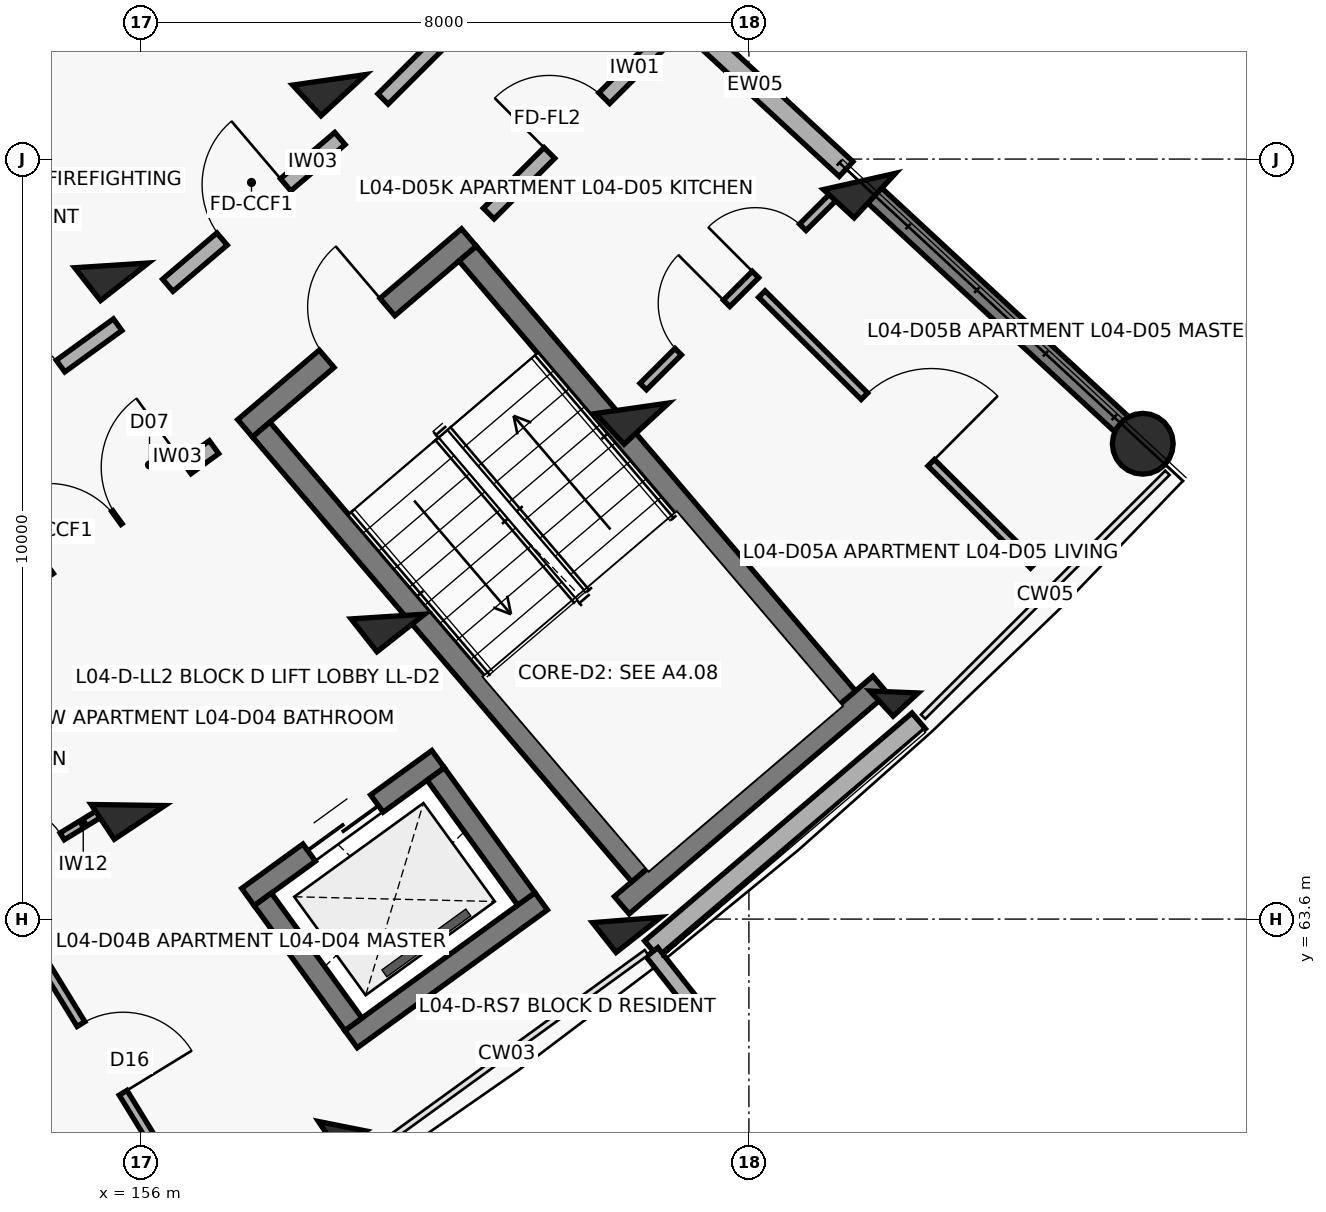
"""IFC4 building model, lengths in metres.
Left out: names, types, materials, properties, quantities, classifications, styles, units other than length and angle.
Written with IfcOpenShell. Run it as: python <this file> out.ifc"""

import sys

from ifc_helpers import new_model, si_unit, direction, frame, frame_2d, origin, origin_2d, place, context, subcontext, project, spatial, rectangle, circle, extrude, element, fill, save


model = new_model("IFC4")
c1 = context("Model", 3, precision=1e-05, world=origin(), true_north=direction((0.0, 1.0)))
c2 = subcontext(c1, "Body", "Model", "MODEL_VIEW")
j1 = project(units=[si_unit("LENGTHUNIT", "METRE"), si_unit("PLANEANGLEUNIT", "RADIAN")], contexts=[c1])
p1 = place(None, origin())
s1 = spatial("IfcSite", under=j1, at=p1, CompositionType="ELEMENT")
p2 = place(p1, origin())
s2 = spatial("IfcBuilding", under=s1, at=p2, CompositionType="ELEMENT")
p3 = place(p2, frame((0.0, 0.0, 14.3)))
s3 = spatial("IfcBuildingStorey", under=s2, at=p3, CompositionType="ELEMENT", Elevation=14.3)
p4 = place(p3, frame((155.831, 65.101, 0.0), z_axis=(0.0, 0.0, 1.0), x_axis=(0.554844427448, -0.83195412213, 0.0)))
e1 = element("IfcColumn", 1, at=p4, inside=s3, PredefinedType="COLUMN", context=c2, shape_type="SweptSolid", body=[
    extrude(rectangle(XDim=0.55, YDim=0.8, at=origin_2d()), origin(), (0.0, 0.0, 1.0), 3.1),
])
p5 = place(p3, frame((158.649, 60.875, 0.0), z_axis=(0.0, 0.0, 1.0), x_axis=(0.554844427448, -0.83195412213, 0.0)))
e2 = element("IfcColumn", 2, at=p5, inside=s3, PredefinedType="COLUMN", context=c2, shape_type="SweptSolid", body=[
    extrude(rectangle(XDim=0.45, YDim=0.45, at=origin_2d()), origin(), (0.0, 0.0, 1.0), 3.1),
])
for number, where, z_axis, x_axis in (
    (3, (155.614, 72.202, 0.0), (0.0, 0.0, 1.0), (0.618, -0.786, 0.0)),
    (4, (159.25, 67.581, 0.0), (0.0, 0.0, 1.0), (0.618, -0.786, 0.0)),
):
    element("IfcColumn", number, at=place(p3, frame(where, z_axis=z_axis, x_axis=x_axis)), inside=s3, PredefinedType="COLUMN", context=c2, shape_type="SweptSolid", body=[
        extrude(rectangle(XDim=0.55, YDim=0.8, at=origin_2d()), origin(), (0.0, 0.0, 1.0), 3.1),
    ])
p6 = place(p3, frame((162.392, 63.589, 0.0), z_axis=(0.0, 0.0, 1.0), x_axis=(0.618408395358, -0.785856893175, 0.0)))
e5 = element("IfcColumn", 5, at=p6, inside=s3, PredefinedType="COLUMN", context=c2, shape_type="SweptSolid", body=[
    extrude(rectangle(XDim=0.5, YDim=0.75, at=origin_2d()), origin(), (0.0, 0.0, 1.0), 3.1),
])
for number, where, z_axis, x_axis in (
    (6, (158.477, 74.643, 0.0), (0.0, 0.0, 1.0), (0.678, -0.735, 0.0)),
    (7, (162.465, 70.322, 0.0), (0.0, 0.0, 1.0), (0.678, -0.735, 0.0)),
):
    element("IfcColumn", number, at=place(p3, frame(where, z_axis=z_axis, x_axis=x_axis)), inside=s3, PredefinedType="COLUMN", context=c2, shape_type="SweptSolid", body=[
        extrude(rectangle(XDim=0.55, YDim=0.8, at=origin_2d()), origin(), (0.0, 0.0, 1.0), 3.1),
    ])
p7 = place(p3, frame((165.91, 66.588, 0.0), z_axis=(0.0, 0.0, 1.0), x_axis=(0.678159669868, -0.73491459515, 0.0)))
e8 = element("IfcColumn", 8, at=p7, inside=s3, PredefinedType="COLUMN", context=c2, shape_type="SweptSolid", body=[
    extrude(rectangle(XDim=0.45, YDim=0.45, at=origin_2d()), origin(), (0.0, 0.0, 1.0), 3.1),
])
p8 = place(p3, frame((165.455, 73.306, 0.0), z_axis=(0.0, 0.0, 1.0), x_axis=(0.733729864503, -0.679441304262, 0.0)))
e9 = element("IfcColumn", 9, at=p8, inside=s3, PredefinedType="COLUMN", context=c2, shape_type="SweptSolid", body=[
    extrude(rectangle(XDim=0.55, YDim=0.8, at=origin_2d()), origin(), (0.0, 0.0, 1.0), 3.1),
])
p9 = place(p3, frame((169.182, 69.854, 0.0), z_axis=(0.0, 0.0, 1.0), x_axis=(0.733729864503, -0.679441304262, 0.0)))
e10 = element("IfcColumn", 10, at=p9, inside=s3, PredefinedType="COLUMN", context=c2, shape_type="SweptSolid", body=[
    extrude(circle(Radius=0.4, at=origin_2d()), origin(), (0.0, 0.0, 1.0), 3.1),
])
p10 = place(p3, frame((165.587, 73.184, 0.0), z_axis=(0.0, 0.0, 1.0), x_axis=(0.733739663667, -0.679430721974, 0.0)))
e11 = element("IfcWall", 11, at=p10, inside=s3, PredefinedType="SHEAR", context=c2, shape_type="SweptSolid", body=[
    extrude(rectangle(XDim=4.72, YDim=0.27, at=frame_2d((2.36, 0.0))), origin(), (0.0, 0.0, 1.0), 2.86),
])
p11 = place(p3, frame((162.716, 63.209, 0.0), z_axis=(0.0, 0.0, 1.0), x_axis=(0.760968923704, 0.64878833001, 0.0)))
e12 = element("IfcWall", 12, at=p11, inside=s3, PredefinedType="SOLIDWALL", context=c2, shape_type="SweptSolid", body=[
    extrude(rectangle(XDim=4.623, YDim=0.272, at=frame_2d((2.311, 0.0))), origin(), (0.0, 0.0, 1.0), 2.25),
])
p12 = place(p3, frame((162.726, 63.164, 0.0), z_axis=(0.0, 0.0, 1.0), x_axis=(0.618456270212, -0.785819217019, 0.0)))
e13 = element("IfcWall", 13, at=p12, inside=s3, PredefinedType="PARAPET", context=c2, shape_type="SweptSolid", body=[
    extrude(rectangle(XDim=0.9, YDim=0.195, at=frame_2d((0.45, 0.0))), origin(), (0.0, 0.0, 1.0), 2.25),
])
p13 = place(p3, frame((153.589, 74.808, 0.0), z_axis=(0.0, 0.0, 1.0), x_axis=(0.760985425115, 0.648768974876, 0.0)))
e14 = element("IfcWall", 14, at=p13, inside=s3, PredefinedType="SOLIDWALL", context=c2, shape_type="SweptSolid", body=[
    extrude(rectangle(XDim=3.464, YDim=0.23, at=frame_2d((1.732, 0.0))), origin(), (0.0, 0.0, 1.0), 2.25),
])
p14 = place(p13, frame((0.932, 0.0, 0.32)))
e15 = element("IfcOpeningElement", 15, at=p14, cuts=e14, PredefinedType="OPENING", context=c2, shape_type="SweptSolid", body=[
    extrude(rectangle(XDim=1.6, YDim=1.5, at=frame_2d((0.8, 0.75))), frame((0.0, 0.125, 0.0), z_axis=(0.0, -1.0, 0.0), x_axis=(1.0, 0.0, 0.0)), (0.0, 0.0, 1.0), 0.25),
])
p15 = place(p3, frame((159.262, 79.041, 0.0), z_axis=(0.0, 0.0, 1.0), x_axis=(0.733738684326, -0.679431779595, 0.0)))
e16 = element("IfcWall", 16, at=p15, inside=s3, PredefinedType="SOLIDWALL", context=c2, shape_type="SweptSolid", body=[
    extrude(rectangle(XDim=8.2, YDim=0.265, at=frame_2d((4.1, 0.0))), origin(), (0.0, 0.0, 1.0), 2.08),
])
p16 = place(p15, frame((3.59, 0.0, 0.75)))
e17 = element("IfcOpeningElement", 17, at=p16, cuts=e16, PredefinedType="OPENING", context=c2, shape_type="SweptSolid", body=[
    extrude(rectangle(XDim=1.35, YDim=1.35, at=frame_2d((0.675, 0.675))), frame((0.0, 0.142, 0.0), z_axis=(0.0, -1.0, 0.0), x_axis=(1.0, 0.0, 0.0)), (0.0, 0.0, 1.0), 0.285),
])
p17 = place(p3, frame((157.372, 70.058, 0.0), z_axis=(0.0, 0.0, 1.0), x_axis=(0.760990583254, 0.648762924495, 0.0)))
e18 = element("IfcWall", 18, at=p17, inside=s3, PredefinedType="SHEAR", context=c2, shape_type="SweptSolid", body=[
    extrude(rectangle(XDim=3.87, YDim=0.3, at=frame_2d((1.935, 0.0))), origin(), (0.0, 0.0, 1.0), 3.1),
])
p18 = place(p17, frame((1.41, 0.0, 0.0)))
e19 = element("IfcOpeningElement", 19, at=p18, cuts=e18, PredefinedType="OPENING", context=c2, shape_type="SweptSolid", body=[
    extrude(rectangle(XDim=1.05, YDim=2.15, at=frame_2d((0.525, 1.075))), frame((0.0, 0.16, 0.0), z_axis=(0.0, -1.0, 0.0), x_axis=(1.0, 0.0, 0.0)), (0.0, 0.0, 1.0), 0.32),
])
p19 = place(p3, frame((162.327, 63.783, 0.0), z_axis=(0.0, 0.0, 1.0), x_axis=(0.760969560012, 0.648787583678, 0.0)))
e20 = element("IfcWall", 20, at=p19, inside=s3, PredefinedType="SHEAR", context=c2, shape_type="SweptSolid", body=[
    extrude(rectangle(XDim=4.47, YDim=0.3, at=frame_2d((2.235, 0.0))), origin(), (0.0, 0.0, 1.0), 3.1),
])
p20 = place(p3, frame((157.583, 70.041, 0.0), z_axis=(0.0, 0.0, 1.0), x_axis=(0.648762810187, -0.760990680704, 0.0)))
e21 = element("IfcWall", 21, at=p20, inside=s3, PredefinedType="SHEAR", context=c2, shape_type="SweptSolid", body=[
    extrude(rectangle(XDim=7.69, YDim=0.3, at=frame_2d((3.845, 0.0))), origin(), (0.0, 0.0, 1.0), 3.1),
])
p21 = place(p3, frame((160.3, 72.357, 0.0), z_axis=(0.0, 0.0, 1.0), x_axis=(0.648781194888, -0.760975006922, 0.0)))
e22 = element("IfcWall", 22, at=p21, inside=s3, PredefinedType="SHEAR", context=c2, shape_type="SweptSolid", body=[
    extrude(rectangle(XDim=7.69, YDim=0.3, at=frame_2d((3.845, 0.0))), origin(), (0.0, 0.0, 1.0), 3.1),
])
p22 = place(p3, frame((157.409, 63.89, 0.0), z_axis=(0.0, 0.0, 1.0), x_axis=(0.809510936031, 0.587104798521, 0.0)))
e23 = element("IfcWall", 23, at=p22, inside=s3, PredefinedType="SHEAR", context=c2, shape_type="SweptSolid", body=[
    extrude(rectangle(XDim=3.09, YDim=0.28, at=frame_2d((1.545, 0.0))), origin(), (0.0, 0.0, 1.0), 3.1),
])
p23 = place(p22, frame((0.995, 0.0, 0.0)))
e24 = element("IfcOpeningElement", 24, at=p23, cuts=e23, PredefinedType="OPENING", context=c2, shape_type="SweptSolid", body=[
    extrude(rectangle(XDim=1.1, YDim=2.15, at=frame_2d((0.55, 1.075))), frame((0.0, 0.15, 0.0), z_axis=(0.0, -1.0, 0.0), x_axis=(1.0, 0.0, 0.0)), (0.0, 0.0, 1.0), 0.3),
])
p24 = place(p3, frame((158.765, 62.021, 0.0), z_axis=(0.0, 0.0, 1.0), x_axis=(0.809548485838, 0.587053020669, 0.0)))
e25 = element("IfcWall", 25, at=p24, inside=s3, PredefinedType="SHEAR", context=c2, shape_type="SweptSolid", body=[
    extrude(rectangle(XDim=3.09, YDim=0.28, at=frame_2d((1.545, 0.0))), origin(), (0.0, 0.0, 1.0), 3.1),
])
p25 = place(p3, frame((157.604, 63.859, 0.0), z_axis=(0.0, 0.0, 1.0), x_axis=(0.587127188998, -0.809494696671, 0.0)))
e26 = element("IfcWall", 26, at=p25, inside=s3, PredefinedType="SHEAR", context=c2, shape_type="SweptSolid", body=[
    extrude(rectangle(XDim=2.03, YDim=0.28, at=frame_2d((1.015, 0.0))), origin(), (0.0, 0.0, 1.0), 3.1),
])
p26 = place(p3, frame((159.879, 65.509, 0.0), z_axis=(0.0, 0.0, 1.0), x_axis=(0.58704837408, -0.809551855344, 0.0)))
e27 = element("IfcWall", 27, at=p26, inside=s3, PredefinedType="SHEAR", context=c2, shape_type="SweptSolid", body=[
    extrude(rectangle(XDim=2.03, YDim=0.28, at=frame_2d((1.015, 0.0))), origin(), (0.0, 0.0, 1.0), 3.1),
])
p27 = place(p3, frame((152.434, 63.141, 0.0), z_axis=(0.0, 0.0, 1.0), x_axis=(0.853089873067, 0.521763996909, 0.0)))
e28 = element("IfcWall", 28, at=p27, inside=s3, PredefinedType="PARTITIONING", context=c2, shape_type="SweptSolid", body=[
    extrude(rectangle(XDim=3.616, YDim=0.105, at=frame_2d((1.808, 0.0))), origin(), (0.0, 0.0, 1.0), 2.08),
])
p28 = place(p27, frame((0.65, 0.0, 0.0)))
e29 = element("IfcOpeningElement", 29, at=p28, cuts=e28, PredefinedType="OPENING", context=c2, shape_type="SweptSolid", body=[
    extrude(rectangle(XDim=0.9, YDim=2.1, at=frame_2d((0.45, 1.05))), frame((0.0, 0.062, 0.0), z_axis=(0.0, -1.0, 0.0), x_axis=(1.0, 0.0, 0.0)), (0.0, 0.0, 1.0), 0.125),
])
p29 = place(p27, frame((2.086, 0.0, 0.0)))
e30 = element("IfcOpeningElement", 30, at=p29, cuts=e28, PredefinedType="OPENING", context=c2, shape_type="SweptSolid", body=[
    extrude(rectangle(XDim=0.88, YDim=2.1, at=frame_2d((0.44, 1.05))), frame((0.0, 0.062, 0.0), z_axis=(0.0, -1.0, 0.0), x_axis=(1.0, 0.0, 0.0)), (0.0, 0.0, 1.0), 0.125),
])
p30 = place(p3, frame((154.169, 63.919, 0.0), z_axis=(0.0, 0.0, 1.0), x_axis=(0.522980301869, -0.852344768188, 0.0)))
e31 = element("IfcWall", 31, at=p30, inside=s3, PredefinedType="PARTITIONING", context=c2, shape_type="SweptSolid", body=[
    extrude(rectangle(XDim=5.05, YDim=0.12, at=frame_2d((2.525, 0.0))), origin(), (0.0, 0.0, 1.0), 2.08),
])
p31 = place(p30, frame((1.995, 0.0, 0.0)))
e32 = element("IfcOpeningElement", 32, at=p31, cuts=e31, PredefinedType="OPENING", context=c2, shape_type="SweptSolid", body=[
    extrude(rectangle(XDim=1.06, YDim=2.1, at=frame_2d((0.53, 1.05))), frame((0.0, 0.07, 0.0), z_axis=(0.0, -1.0, 0.0), x_axis=(1.0, 0.0, 0.0)), (0.0, 0.0, 1.0), 0.14),
])
p32 = place(p3, frame((154.423, 67.968, 0.0), z_axis=(0.0, 0.0, 1.0), x_axis=(0.809516127005, 0.587097641043, 0.0)))
e33 = element("IfcWall", 33, at=p32, inside=s3, PredefinedType="SOLIDWALL", context=c2, shape_type="SweptSolid", body=[
    extrude(rectangle(XDim=3.137, YDim=0.21, at=frame_2d((1.569, 0.0))), origin(), (0.0, 0.0, 1.0), 2.08),
])
p33 = place(p32, frame((0.45, 0.0, 0.0)))
e34 = element("IfcOpeningElement", 34, at=p33, cuts=e33, PredefinedType="OPENING", context=c2, shape_type="SweptSolid", body=[
    extrude(rectangle(XDim=1.1, YDim=2.15, at=frame_2d((0.55, 1.075))), frame((0.0, 0.115, 0.0), z_axis=(0.0, -1.0, 0.0), x_axis=(1.0, 0.0, 0.0)), (0.0, 0.0, 1.0), 0.23),
])
p34 = place(p32, frame((1.567, 0.0, 0.0)))
e35 = element("IfcOpeningElement", 35, at=p34, cuts=e33, PredefinedType="OPENING", context=c2, shape_type="SweptSolid", body=[
    extrude(rectangle(XDim=1.12, YDim=2.15, at=frame_2d((0.56, 1.075))), frame((0.0, 0.115, 0.0), z_axis=(0.0, -1.0, 0.0), x_axis=(1.0, 0.0, 0.0)), (0.0, 0.0, 1.0), 0.23),
])
p35 = place(p3, frame((153.285, 69.674, 0.0), z_axis=(0.0, 0.0, 1.0), x_axis=(0.809505174959, 0.587112741911, 0.0)))
e36 = element("IfcWall", 36, at=p35, inside=s3, PredefinedType="SOLIDWALL", context=c2, shape_type="SweptSolid", body=[
    extrude(rectangle(XDim=2.976, YDim=0.19, at=frame_2d((1.488, 0.0))), origin(), (0.0, 0.0, 1.0), 2.08),
])
p36 = place(p35, frame((0.928, 0.0, 0.0)))
e37 = element("IfcOpeningElement", 37, at=p36, cuts=e36, PredefinedType="OPENING", context=c2, shape_type="SweptSolid", body=[
    extrude(rectangle(XDim=1.12, YDim=2.15, at=frame_2d((0.56, 1.075))), frame((0.0, 0.105, 0.0), z_axis=(0.0, -1.0, 0.0), x_axis=(1.0, 0.0, 0.0)), (0.0, 0.0, 1.0), 0.21),
])
p37 = place(p3, frame((156.354, 71.94, 0.0), z_axis=(0.0, 0.0, 1.0), x_axis=(0.760991187621, 0.648762215579, 0.0)))
e38 = element("IfcWall", 38, at=p37, inside=s3, PredefinedType="SOLIDWALL", context=c2, shape_type="SweptSolid", body=[
    extrude(rectangle(XDim=2.976, YDim=0.21, at=frame_2d((1.488, 0.0))), origin(), (0.0, 0.0, 1.0), 2.08),
])
p38 = place(p37, frame((0.938, 0.0, 0.0)))
e39 = element("IfcOpeningElement", 39, at=p38, cuts=e38, PredefinedType="OPENING", context=c2, shape_type="SweptSolid", body=[
    extrude(rectangle(XDim=1.1, YDim=2.15, at=frame_2d((0.55, 1.075))), frame((0.0, 0.115, 0.0), z_axis=(0.0, -1.0, 0.0), x_axis=(1.0, 0.0, 0.0)), (0.0, 0.0, 1.0), 0.23),
])
p39 = place(p3, frame((160.576, 72.884, 0.0), z_axis=(0.0, 0.0, 1.0), x_axis=(0.70773973846, 0.706473256822, 0.0)))
e40 = element("IfcWall", 40, at=p39, inside=s3, PredefinedType="SOLIDWALL", context=c2, shape_type="SweptSolid", body=[
    extrude(rectangle(XDim=3.277, YDim=0.2, at=frame_2d((1.639, 0.0))), origin(), (0.0, 0.0, 1.0), 2.08),
])
p40 = place(p39, frame((1.128, 0.0, 0.0)))
e41 = element("IfcOpeningElement", 41, at=p40, cuts=e40, PredefinedType="OPENING", context=c2, shape_type="SweptSolid", body=[
    extrude(rectangle(XDim=1.02, YDim=2.15, at=frame_2d((0.51, 1.075))), frame((0.0, 0.11, 0.0), z_axis=(0.0, -1.0, 0.0), x_axis=(1.0, 0.0, 0.0)), (0.0, 0.0, 1.0), 0.22),
])
p41 = place(p3, frame((159.186, 74.39, 0.0), z_axis=(0.0, 0.0, 1.0), x_axis=(0.70773330139, 0.706479705373, 0.0)))
e42 = element("IfcWall", 42, at=p41, inside=s3, PredefinedType="SOLIDWALL", context=c2, shape_type="SweptSolid", body=[
    extrude(rectangle(XDim=3.116, YDim=0.19, at=frame_2d((1.558, 0.0))), origin(), (0.0, 0.0, 1.0), 2.08),
])
p42 = place(p41, frame((1.098, 0.0, 0.0)))
e43 = element("IfcOpeningElement", 43, at=p42, cuts=e42, PredefinedType="OPENING", context=c2, shape_type="SweptSolid", body=[
    extrude(rectangle(XDim=0.92, YDim=2.1, at=frame_2d((0.46, 1.05))), frame((0.0, 0.105, 0.0), z_axis=(0.0, -1.0, 0.0), x_axis=(1.0, 0.0, 0.0)), (0.0, 0.0, 1.0), 0.21),
])
p43 = place(p3, frame((162.609, 70.607, 0.0), z_axis=(0.0, 0.0, 1.0), x_axis=(0.707714058013, 0.70649898237, 0.0)))
e44 = element("IfcWall", 44, at=p43, inside=s3, PredefinedType="PARTITIONING", context=c2, shape_type="SweptSolid", body=[
    extrude(rectangle(XDim=3.617, YDim=0.12, at=frame_2d((1.808, 0.0))), origin(), (0.0, 0.0, 1.0), 2.08),
])
p44 = place(p43, frame((0.65, 0.0, 0.0)))
e45 = element("IfcOpeningElement", 45, at=p44, cuts=e44, PredefinedType="OPENING", context=c2, shape_type="SweptSolid", body=[
    extrude(rectangle(XDim=0.9, YDim=2.1, at=frame_2d((0.45, 1.05))), frame((0.0, 0.07, 0.0), z_axis=(0.0, -1.0, 0.0), x_axis=(1.0, 0.0, 0.0)), (0.0, 0.0, 1.0), 0.14),
])
p45 = place(p43, frame((2.086, 0.0, 0.0)))
e46 = element("IfcOpeningElement", 46, at=p45, cuts=e44, PredefinedType="OPENING", context=c2, shape_type="SweptSolid", body=[
    extrude(rectangle(XDim=0.88, YDim=2.1, at=frame_2d((0.44, 1.05))), frame((0.0, 0.07, 0.0), z_axis=(0.0, -1.0, 0.0), x_axis=(1.0, 0.0, 0.0)), (0.0, 0.0, 1.0), 0.14),
])
p46 = place(p3, frame((164.17, 71.824, 0.0), z_axis=(0.0, 0.0, 1.0), x_axis=(0.708531494679, -0.70567919131, 0.0)))
e47 = element("IfcWall", 47, at=p46, inside=s3, PredefinedType="PARTITIONING", context=c2, shape_type="SweptSolid", body=[
    extrude(rectangle(XDim=5.05, YDim=0.12, at=frame_2d((2.525, 0.0))), origin(), (0.0, 0.0, 1.0), 2.08),
])
p47 = place(p46, frame((1.905, 0.0, 0.0)))
e48 = element("IfcOpeningElement", 48, at=p47, cuts=e47, PredefinedType="OPENING", context=c2, shape_type="SweptSolid", body=[
    extrude(rectangle(XDim=1.24, YDim=2.1, at=frame_2d((0.62, 1.05))), frame((0.0, 0.07, 0.0), z_axis=(0.0, -1.0, 0.0), x_axis=(1.0, 0.0, 0.0)), (0.0, 0.0, 1.0), 0.14),
])
p48 = place(p18, origin())
e49 = element("IfcDoor", 49, at=p48, inside=s3, OperationType="SINGLE_SWING_RIGHT", PredefinedType="DOOR", context=c2, shape_type="SweptSolid", body=[
    extrude(rectangle(XDim=1.05, YDim=2.15, at=frame_2d((0.525, 1.075))), frame((0.0, 0.025, 0.0), z_axis=(0.0, -1.0, 0.0), x_axis=(1.0, 0.0, 0.0)), (0.0, 0.0, 1.0), 0.05),
])
fill(e19, e49)
p49 = place(p23, origin())
e50 = element("IfcDoor", 50, at=p49, inside=s3, OperationType="DOUBLE_DOOR_SLIDING", PredefinedType="DOOR", context=c2, shape_type="SweptSolid", body=[
    extrude(rectangle(XDim=1.1, YDim=2.15, at=frame_2d((0.55, 1.075))), frame((0.0, 0.025, 0.0), z_axis=(0.0, -1.0, 0.0), x_axis=(1.0, 0.0, 0.0)), (0.0, 0.0, 1.0), 0.05),
])
fill(e24, e50)
p50 = place(p29, origin())
e51 = element("IfcDoor", 51, at=p50, inside=s3, OperationType="SINGLE_SWING_LEFT", PredefinedType="DOOR", context=c2, shape_type="SweptSolid", body=[
    extrude(rectangle(XDim=0.88, YDim=2.1, at=frame_2d((0.44, 1.05))), frame((0.0, 0.025, 0.0), z_axis=(0.0, -1.0, 0.0), x_axis=(1.0, 0.0, 0.0)), (0.0, 0.0, 1.0), 0.05),
])
fill(e30, e51)
p51 = place(p31, origin())
e52 = element("IfcDoor", 52, at=p51, inside=s3, OperationType="SINGLE_SWING_RIGHT", PredefinedType="DOOR", context=c2, shape_type="SweptSolid", body=[
    extrude(rectangle(XDim=1.06, YDim=2.1, at=frame_2d((0.53, 1.05))), frame((0.0, 0.025, 0.0), z_axis=(0.0, -1.0, 0.0), x_axis=(1.0, 0.0, 0.0)), (0.0, 0.0, 1.0), 0.05),
])
fill(e32, e52)
p52 = place(p33, origin())
e53 = element("IfcDoor", 53, at=p52, inside=s3, OperationType="SINGLE_SWING_LEFT", PredefinedType="DOOR", context=c2, shape_type="SweptSolid", body=[
    extrude(rectangle(XDim=1.1, YDim=2.15, at=frame_2d((0.55, 1.075))), frame((0.0, 0.025, 0.0), z_axis=(0.0, -1.0, 0.0), x_axis=(1.0, 0.0, 0.0)), (0.0, 0.0, 1.0), 0.05),
])
fill(e34, e53)
p53 = place(p34, origin())
e54 = element("IfcDoor", 54, at=p53, inside=s3, OperationType="SINGLE_SWING_RIGHT", PredefinedType="DOOR", context=c2, shape_type="SweptSolid", body=[
    extrude(rectangle(XDim=1.12, YDim=2.15, at=frame_2d((0.56, 1.075))), frame((0.0, 0.025, 0.0), z_axis=(0.0, -1.0, 0.0), x_axis=(1.0, 0.0, 0.0)), (0.0, 0.0, 1.0), 0.05),
])
fill(e35, e54)
p54 = place(p36, origin())
e55 = element("IfcDoor", 55, at=p54, inside=s3, OperationType="SINGLE_SWING_LEFT", PredefinedType="DOOR", context=c2, shape_type="SweptSolid", body=[
    extrude(rectangle(XDim=1.12, YDim=2.15, at=frame_2d((0.56, 1.075))), frame((0.0, 0.025, 0.0), z_axis=(0.0, -1.0, 0.0), x_axis=(1.0, 0.0, 0.0)), (0.0, 0.0, 1.0), 0.05),
])
fill(e37, e55)
p55 = place(p38, origin())
e56 = element("IfcDoor", 56, at=p55, inside=s3, OperationType="SINGLE_SWING_RIGHT", PredefinedType="DOOR", context=c2, shape_type="SweptSolid", body=[
    extrude(rectangle(XDim=1.1, YDim=2.15, at=frame_2d((0.55, 1.075))), frame((0.0, 0.025, 0.0), z_axis=(0.0, -1.0, 0.0), x_axis=(1.0, 0.0, 0.0)), (0.0, 0.0, 1.0), 0.05),
])
fill(e39, e56)
p56 = place(p40, origin())
e57 = element("IfcDoor", 57, at=p56, inside=s3, OperationType="SINGLE_SWING_LEFT", PredefinedType="DOOR", context=c2, shape_type="SweptSolid", body=[
    extrude(rectangle(XDim=1.02, YDim=2.15, at=frame_2d((0.51, 1.075))), frame((0.0, 0.025, 0.0), z_axis=(0.0, -1.0, 0.0), x_axis=(1.0, 0.0, 0.0)), (0.0, 0.0, 1.0), 0.05),
])
fill(e41, e57)
p57 = place(p44, origin())
e58 = element("IfcDoor", 58, at=p57, inside=s3, OperationType="SINGLE_SWING_RIGHT", PredefinedType="DOOR", context=c2, shape_type="SweptSolid", body=[
    extrude(rectangle(XDim=0.9, YDim=2.1, at=frame_2d((0.45, 1.05))), frame((0.0, 0.025, 0.0), z_axis=(0.0, -1.0, 0.0), x_axis=(1.0, 0.0, 0.0)), (0.0, 0.0, 1.0), 0.05),
])
fill(e45, e58)
p58 = place(p45, origin())
e59 = element("IfcDoor", 59, at=p58, inside=s3, OperationType="SINGLE_SWING_LEFT", PredefinedType="DOOR", context=c2, shape_type="SweptSolid", body=[
    extrude(rectangle(XDim=0.88, YDim=2.1, at=frame_2d((0.44, 1.05))), frame((0.0, 0.025, 0.0), z_axis=(0.0, -1.0, 0.0), x_axis=(1.0, 0.0, 0.0)), (0.0, 0.0, 1.0), 0.05),
])
fill(e46, e59)
p59 = place(p47, origin())
e60 = element("IfcDoor", 60, at=p59, inside=s3, OperationType="SINGLE_SWING_RIGHT", PredefinedType="DOOR", context=c2, shape_type="SweptSolid", body=[
    extrude(rectangle(XDim=1.24, YDim=2.1, at=frame_2d((0.62, 1.05))), frame((0.0, 0.025, 0.0), z_axis=(0.0, -1.0, 0.0), x_axis=(1.0, 0.0, 0.0)), (0.0, 0.0, 1.0), 0.05),
])
fill(e48, e60)
save(model, sys.argv[1])
